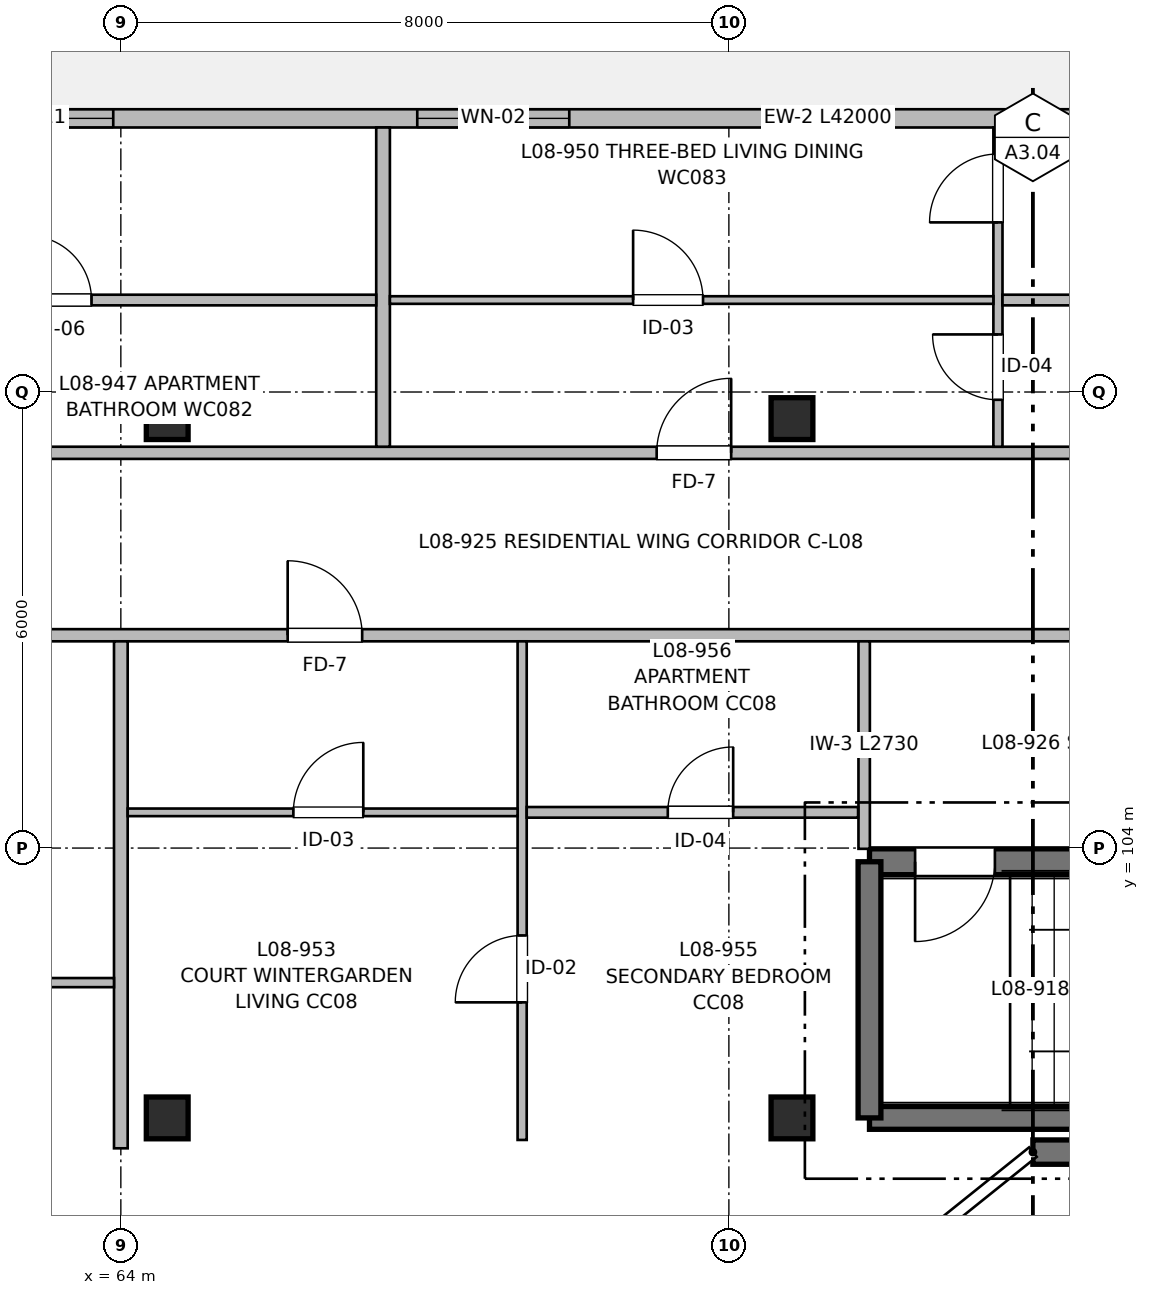
"""IFC4 building model, lengths in metres.
Left out: names, types, materials, properties, quantities, classifications, styles, units other than length and angle.
Written with IfcOpenShell. Run it as: python <this file> out.ifc"""

import sys

from ifc_helpers import new_model, si_unit, direction, frame, frame_2d, origin, origin_2d, place, context, subcontext, project, spatial, rectangle, extrude, element, fill, save


model = new_model("IFC4")
c1 = context("Model", 3, precision=1e-05, world=origin(), true_north=direction((0.0, 1.0)))
c2 = subcontext(c1, "Body", "Model", "MODEL_VIEW")
j1 = project(units=[si_unit("LENGTHUNIT", "METRE"), si_unit("PLANEANGLEUNIT", "RADIAN")], contexts=[c1])
p1 = place(None, origin())
s1 = spatial("IfcSite", under=j1, at=p1, CompositionType="ELEMENT")
p2 = place(p1, origin())
s2 = spatial("IfcBuilding", under=s1, at=p2, CompositionType="ELEMENT")
p3 = place(p2, frame((0.0, 0.0, 26.56)))
s3 = spatial("IfcBuildingStorey", under=s2, at=p3, CompositionType="ELEMENT", Elevation=26.56)
for number, where, z_axis, x_axis in (
    (1, (64.61, 100.45, 0.0), (0.0, 0.0, 1.0), (1.0, 0.0, 0.0)),
    (2, (64.61, 109.65, 0.0), (0.0, 0.0, 1.0), (1.0, 0.0, 0.0)),
    (3, (72.83, 100.45, 0.0), (0.0, 0.0, 1.0), (1.0, 0.0, 0.0)),
    (4, (72.83, 109.65, 0.0), (0.0, 0.0, 1.0), (1.0, 0.0, 0.0)),
):
    element("IfcColumn", number, at=place(p3, frame(where, z_axis=z_axis, x_axis=x_axis)), inside=s3, PredefinedType="COLUMN", context=c2, shape_type="SweptSolid", body=[
        extrude(rectangle(XDim=0.55, YDim=0.55, at=origin_2d()), origin(), (0.0, 0.0, 1.0), 3.2),
    ])
p4 = place(p3, frame((73.85, 100.45, 0.0), z_axis=(0.0, 0.0, 1.0), x_axis=(1.0, 0.0, 0.0)))
e5 = element("IfcWall", 5, at=p4, inside=s3, PredefinedType="SHEAR", context=c2, shape_type="SweptSolid", body=[
    extrude(rectangle(XDim=6.9, YDim=0.3, at=frame_2d((3.45, 0.0))), origin(), (0.0, 0.0, 1.0), 3.2),
])
p5 = place(p3, frame((80.75, 103.82, 0.0), z_axis=(0.0, 0.0, 1.0), x_axis=(-1.0, 0.0, 0.0)))
e6 = element("IfcWall", 6, at=p5, inside=s3, PredefinedType="SHEAR", context=c2, shape_type="SweptSolid", body=[
    extrude(rectangle(XDim=6.9, YDim=0.34, at=frame_2d((3.45, 0.0))), origin(), (0.0, 0.0, 1.0), 3.2),
])
p6 = place(p5, frame((5.25, 0.0, 0.0)))
e7 = element("IfcOpeningElement", 7, at=p6, cuts=e6, PredefinedType="OPENING", context=c2, shape_type="SweptSolid", body=[
    extrude(rectangle(XDim=1.05, YDim=2.15, at=frame_2d((0.525, 1.075))), frame((0.0, 0.18, 0.0), z_axis=(0.0, -1.0, 0.0), x_axis=(1.0, 0.0, 0.0)), (0.0, 0.0, 1.0), 0.36),
])
p7 = place(p3, frame((73.85, 103.82, 0.0), z_axis=(0.0, 0.0, 1.0), x_axis=(0.0, -1.0, 0.0)))
e8 = element("IfcWall", 8, at=p7, inside=s3, PredefinedType="SHEAR", context=c2, shape_type="SweptSolid", body=[
    extrude(rectangle(XDim=3.37, YDim=0.3, at=frame_2d((1.685, 0.0))), origin(), (0.0, 0.0, 1.0), 3.2),
])
p8 = place(p3, frame((81.5, 100.0, 0.0), z_axis=(0.0, 0.0, 1.0), x_axis=(-1.0, 0.0, 0.0)))
e9 = element("IfcWall", 9, at=p8, inside=s3, PredefinedType="SHEAR", context=c2, shape_type="SweptSolid", body=[
    extrude(rectangle(XDim=5.5, YDim=0.32, at=frame_2d((2.75, 0.0))), origin(), (0.0, 0.0, 1.0), 2.98),
])
p9 = place(p8, frame((1.45, 0.0, 0.67)))
e10 = element("IfcOpeningElement", 10, at=p9, cuts=e9, PredefinedType="OPENING", context=c2, shape_type="SweptSolid", body=[
    extrude(rectangle(XDim=2.6, YDim=1.55, at=frame_2d((1.3, 0.775))), frame((0.0, 0.17, 0.0), z_axis=(0.0, -1.0, 0.0), x_axis=(1.0, 0.0, 0.0)), (0.0, 0.0, 1.0), 0.34),
])
p10 = place(p3, frame((39.5, 113.6, 0.0), z_axis=(0.0, 0.0, 1.0), x_axis=(1.0, 0.0, 0.0)))
e11 = element("IfcWall", 11, at=p10, inside=s3, PredefinedType="SOLIDWALL", context=c2, shape_type="SweptSolid", body=[
    extrude(rectangle(XDim=42.0, YDim=0.24, at=frame_2d((21.0, 0.0))), origin(), (0.0, 0.0, 1.0), 2.98),
])
p11 = place(p10, frame((3.6, 0.0, 0.0)))
e12 = element("IfcOpeningElement", 12, at=p11, cuts=e11, PredefinedType="OPENING", context=c2, shape_type="SweptSolid", body=[
    extrude(rectangle(XDim=1.2, YDim=2.2, at=frame_2d((0.6, 1.1))), frame((0.0, 0.13, 0.0), z_axis=(0.0, -1.0, 0.0), x_axis=(1.0, 0.0, 0.0)), (0.0, 0.0, 1.0), 0.26),
])
p12 = place(p10, frame((5.5, 0.0, 0.87)))
e13 = element("IfcOpeningElement", 13, at=p12, cuts=e11, PredefinedType="OPENING", context=c2, shape_type="SweptSolid", body=[
    extrude(rectangle(XDim=1.25, YDim=1.35, at=frame_2d((0.625, 0.675))), frame((0.0, 0.13, 0.0), z_axis=(0.0, -1.0, 0.0), x_axis=(1.0, 0.0, 0.0)), (0.0, 0.0, 1.0), 0.26),
])
p13 = place(p10, frame((11.76, 0.0, 0.72)))
e14 = element("IfcOpeningElement", 14, at=p13, cuts=e11, PredefinedType="OPENING", context=c2, shape_type="SweptSolid", body=[
    extrude(rectangle(XDim=1.68, YDim=1.5, at=frame_2d((0.84, 0.75))), frame((0.0, 0.13, 0.0), z_axis=(0.0, -1.0, 0.0), x_axis=(1.0, 0.0, 0.0)), (0.0, 0.0, 1.0), 0.26),
])
p14 = place(p10, frame((20.4, 0.0, 0.0)))
e15 = element("IfcOpeningElement", 15, at=p14, cuts=e11, PredefinedType="OPENING", context=c2, shape_type="SweptSolid", body=[
    extrude(rectangle(XDim=1.2, YDim=2.2, at=frame_2d((0.6, 1.1))), frame((0.0, 0.13, 0.0), z_axis=(0.0, -1.0, 0.0), x_axis=(1.0, 0.0, 0.0)), (0.0, 0.0, 1.0), 0.26),
])
p15 = place(p10, frame((22.3, 0.0, 0.67)))
e16 = element("IfcOpeningElement", 16, at=p15, cuts=e11, PredefinedType="OPENING", context=c2, shape_type="SweptSolid", body=[
    extrude(rectangle(XDim=2.1, YDim=1.55, at=frame_2d((1.05, 0.775))), frame((0.0, 0.13, 0.0), z_axis=(0.0, -1.0, 0.0), x_axis=(1.0, 0.0, 0.0)), (0.0, 0.0, 1.0), 0.26),
])
p16 = place(p10, frame((28.4, 0.0, 0.72)))
e17 = element("IfcOpeningElement", 17, at=p16, cuts=e11, PredefinedType="OPENING", context=c2, shape_type="SweptSolid", body=[
    extrude(rectangle(XDim=2.0, YDim=1.5, at=frame_2d((1.0, 0.75))), frame((0.0, 0.13, 0.0), z_axis=(0.0, -1.0, 0.0), x_axis=(1.0, 0.0, 0.0)), (0.0, 0.0, 1.0), 0.26),
])
p17 = place(p10, frame((37.2, 0.0, 0.0)))
e18 = element("IfcOpeningElement", 18, at=p17, cuts=e11, PredefinedType="OPENING", context=c2, shape_type="SweptSolid", body=[
    extrude(rectangle(XDim=1.2, YDim=2.2, at=frame_2d((0.6, 1.1))), frame((0.0, 0.13, 0.0), z_axis=(0.0, -1.0, 0.0), x_axis=(1.0, 0.0, 0.0)), (0.0, 0.0, 1.0), 0.26),
])
p18 = place(p10, frame((39.1, 0.0, 0.9)))
e19 = element("IfcOpeningElement", 19, at=p18, cuts=e11, PredefinedType="OPENING", context=c2, shape_type="SweptSolid", body=[
    extrude(rectangle(XDim=1.05, YDim=1.15, at=frame_2d((0.525, 0.575))), frame((0.0, 0.13, 0.0), z_axis=(0.0, -1.0, 0.0), x_axis=(1.0, 0.0, 0.0)), (0.0, 0.0, 1.0), 0.26),
])
p19 = place(p3, frame((57.2, 106.8, 0.0), z_axis=(0.0, 0.0, 1.0), x_axis=(1.0, 0.0, 0.0)))
e20 = element("IfcWall", 20, at=p19, inside=s3, PredefinedType="PARTITIONING", context=c2, shape_type="SweptSolid", body=[
    extrude(rectangle(XDim=24.14, YDim=0.16, at=frame_2d((12.07, 0.0))), origin(), (0.0, 0.0, 1.0), 2.935),
])
p20 = place(p19, frame((19.575, 0.0, 0.0)))
e21 = element("IfcOpeningElement", 21, at=p20, cuts=e20, PredefinedType="OPENING", context=c2, shape_type="SweptSolid", body=[
    extrude(rectangle(XDim=1.05, YDim=2.15, at=frame_2d((0.525, 1.075))), frame((0.0, 0.09, 0.0), z_axis=(0.0, -1.0, 0.0), x_axis=(1.0, 0.0, 0.0)), (0.0, 0.0, 1.0), 0.18),
])
p21 = place(p19, frame((8.995, 0.0, 0.0)))
e22 = element("IfcOpeningElement", 22, at=p21, cuts=e20, PredefinedType="OPENING", context=c2, shape_type="SweptSolid", body=[
    extrude(rectangle(XDim=0.98, YDim=2.15, at=frame_2d((0.49, 1.075))), frame((0.0, 0.09, 0.0), z_axis=(0.0, -1.0, 0.0), x_axis=(1.0, 0.0, 0.0)), (0.0, 0.0, 1.0), 0.18),
])
p22 = place(p3, frame((39.66, 109.2, 0.0), z_axis=(0.0, 0.0, 1.0), x_axis=(1.0, 0.0, 0.0)))
e23 = element("IfcWall", 23, at=p22, inside=s3, PredefinedType="PARTITIONING", context=c2, shape_type="SweptSolid", body=[
    extrude(rectangle(XDim=41.68, YDim=0.16, at=frame_2d((20.84, 0.0))), origin(), (0.0, 0.0, 1.0), 2.935),
])
p23 = place(p22, frame((3.51, 0.0, 0.0)))
e24 = element("IfcOpeningElement", 24, at=p23, cuts=e23, PredefinedType="OPENING", context=c2, shape_type="SweptSolid", body=[
    extrude(rectangle(XDim=0.98, YDim=2.15, at=frame_2d((0.49, 1.075))), frame((0.0, 0.09, 0.0), z_axis=(0.0, -1.0, 0.0), x_axis=(1.0, 0.0, 0.0)), (0.0, 0.0, 1.0), 0.18),
])
p24 = place(p22, frame((17.47, 0.0, 0.0)))
e25 = element("IfcOpeningElement", 25, at=p24, cuts=e23, PredefinedType="OPENING", context=c2, shape_type="SweptSolid", body=[
    extrude(rectangle(XDim=0.98, YDim=2.15, at=frame_2d((0.49, 1.075))), frame((0.0, 0.09, 0.0), z_axis=(0.0, -1.0, 0.0), x_axis=(1.0, 0.0, 0.0)), (0.0, 0.0, 1.0), 0.18),
])
p25 = place(p22, frame((31.39, 0.0, 0.0)))
e26 = element("IfcOpeningElement", 26, at=p25, cuts=e23, PredefinedType="OPENING", context=c2, shape_type="SweptSolid", body=[
    extrude(rectangle(XDim=0.98, YDim=2.15, at=frame_2d((0.49, 1.075))), frame((0.0, 0.09, 0.0), z_axis=(0.0, -1.0, 0.0), x_axis=(1.0, 0.0, 0.0)), (0.0, 0.0, 1.0), 0.18),
])
p26 = place(p3, frame((64.0, 100.05, 0.0), z_axis=(0.0, 0.0, 1.0), x_axis=(0.0, 1.0, 0.0)))
e27 = element("IfcWall", 27, at=p26, inside=s3, PredefinedType="PARTITIONING", context=c2, shape_type="SweptSolid", body=[
    extrude(rectangle(XDim=6.67, YDim=0.18, at=frame_2d((3.335, 0.0))), origin(), (0.0, 0.0, 1.0), 2.935),
])
p27 = place(p3, frame((73.78, 103.99, 0.0), z_axis=(0.0, 0.0, 1.0), x_axis=(0.0, 1.0, 0.0)))
e28 = element("IfcWall", 28, at=p27, inside=s3, PredefinedType="PARTITIONING", context=c2, shape_type="SweptSolid", body=[
    extrude(rectangle(XDim=2.73, YDim=0.15, at=frame_2d((1.365, 0.0))), origin(), (0.0, 0.0, 1.0), 2.935),
])
p28 = place(p3, frame((59.72, 102.23, 0.0), z_axis=(0.0, 0.0, 1.0), x_axis=(1.0, 0.0, 0.0)))
e29 = element("IfcWall", 29, at=p28, inside=s3, PredefinedType="PARTITIONING", context=c2, shape_type="SweptSolid", body=[
    extrude(rectangle(XDim=4.19, YDim=0.12, at=frame_2d((2.095, 0.0))), origin(), (0.0, 0.0, 1.0), 2.935),
])
p29 = place(p28, frame((1.645, 0.0, 0.0)))
e30 = element("IfcOpeningElement", 30, at=p29, cuts=e29, PredefinedType="OPENING", context=c2, shape_type="SweptSolid", body=[
    extrude(rectangle(XDim=0.9, YDim=2.1, at=frame_2d((0.45, 1.05))), frame((0.0, 0.07, 0.0), z_axis=(0.0, -1.0, 0.0), x_axis=(1.0, 0.0, 0.0)), (0.0, 0.0, 1.0), 0.14),
])
p30 = place(p3, frame((67.45, 109.28, 0.0), z_axis=(0.0, 0.0, 1.0), x_axis=(0.0, 1.0, 0.0)))
e31 = element("IfcWall", 31, at=p30, inside=s3, PredefinedType="PARTITIONING", context=c2, shape_type="SweptSolid", body=[
    extrude(rectangle(XDim=4.2, YDim=0.18, at=frame_2d((2.1, 0.0))), origin(), (0.0, 0.0, 1.0), 2.935),
])
p31 = place(p3, frame((61.66, 111.21, 0.0), z_axis=(0.0, 0.0, 1.0), x_axis=(1.0, 0.0, 0.0)))
e32 = element("IfcWall", 32, at=p31, inside=s3, PredefinedType="PARTITIONING", context=c2, shape_type="SweptSolid", body=[
    extrude(rectangle(XDim=5.7, YDim=0.14, at=frame_2d((2.85, 0.0))), origin(), (0.0, 0.0, 1.0), 2.935),
])
p32 = place(p31, frame((1.104, 0.0, 0.0)))
e33 = element("IfcOpeningElement", 33, at=p32, cuts=e32, PredefinedType="OPENING", context=c2, shape_type="SweptSolid", body=[
    extrude(rectangle(XDim=0.85, YDim=2.05, at=frame_2d((0.425, 1.025))), frame((0.0, 0.08, 0.0), z_axis=(0.0, -1.0, 0.0), x_axis=(1.0, 0.0, 0.0)), (0.0, 0.0, 1.0), 0.16),
])
p33 = place(p3, frame((75.54, 109.28, 0.0), z_axis=(0.0, 0.0, 1.0), x_axis=(0.0, 1.0, 0.0)))
e34 = element("IfcWall", 34, at=p33, inside=s3, PredefinedType="PARTITIONING", context=c2, shape_type="SweptSolid", body=[
    extrude(rectangle(XDim=4.2, YDim=0.12, at=frame_2d((2.1, 0.0))), origin(), (0.0, 0.0, 1.0), 2.935),
])
p34 = place(p33, frame((0.618, 0.0, 0.0)))
e35 = element("IfcOpeningElement", 35, at=p34, cuts=e34, PredefinedType="OPENING", context=c2, shape_type="SweptSolid", body=[
    extrude(rectangle(XDim=0.86, YDim=2.1, at=frame_2d((0.43, 1.05))), frame((0.0, 0.07, 0.0), z_axis=(0.0, -1.0, 0.0), x_axis=(1.0, 0.0, 0.0)), (0.0, 0.0, 1.0), 0.14),
])
p35 = place(p33, frame((2.951, 0.0, 0.0)))
e36 = element("IfcOpeningElement", 36, at=p35, cuts=e34, PredefinedType="OPENING", context=c2, shape_type="SweptSolid", body=[
    extrude(rectangle(XDim=0.9, YDim=2.1, at=frame_2d((0.45, 1.05))), frame((0.0, 0.07, 0.0), z_axis=(0.0, -1.0, 0.0), x_axis=(1.0, 0.0, 0.0)), (0.0, 0.0, 1.0), 0.14),
])
p36 = place(p3, frame((75.6, 111.21, 0.0), z_axis=(0.0, 0.0, 1.0), x_axis=(1.0, 0.0, 0.0)))
e37 = element("IfcWall", 37, at=p36, inside=s3, PredefinedType="PARTITIONING", context=c2, shape_type="SweptSolid", body=[
    extrude(rectangle(XDim=5.74, YDim=0.14, at=frame_2d((2.87, 0.0))), origin(), (0.0, 0.0, 1.0), 2.935),
])
p37 = place(p36, frame((2.32, 0.0, 0.0)))
e38 = element("IfcOpeningElement", 38, at=p37, cuts=e37, PredefinedType="OPENING", context=c2, shape_type="SweptSolid", body=[
    extrude(rectangle(XDim=0.85, YDim=2.05, at=frame_2d((0.425, 1.025))), frame((0.0, 0.08, 0.0), z_axis=(0.0, -1.0, 0.0), x_axis=(1.0, 0.0, 0.0)), (0.0, 0.0, 1.0), 0.16),
])
p38 = place(p3, frame((67.54, 111.21, 0.0), z_axis=(0.0, 0.0, 1.0), x_axis=(1.0, 0.0, 0.0)))
e39 = element("IfcWall", 39, at=p38, inside=s3, PredefinedType="PARTITIONING", context=c2, shape_type="SweptSolid", body=[
    extrude(rectangle(XDim=7.94, YDim=0.1, at=frame_2d((3.97, 0.0))), origin(), (0.0, 0.0, 1.0), 2.935),
])
p39 = place(p38, frame((3.2, 0.0, 0.0)))
e40 = element("IfcOpeningElement", 40, at=p39, cuts=e39, PredefinedType="OPENING", context=c2, shape_type="SweptSolid", body=[
    extrude(rectangle(XDim=0.92, YDim=2.1, at=frame_2d((0.46, 1.05))), frame((0.0, 0.06, 0.0), z_axis=(0.0, -1.0, 0.0), x_axis=(1.0, 0.0, 0.0)), (0.0, 0.0, 1.0), 0.12),
])
p40 = place(p3, frame((69.28, 100.16, 0.0), z_axis=(0.0, 0.0, 1.0), x_axis=(0.0, 1.0, 0.0)))
e41 = element("IfcWall", 41, at=p40, inside=s3, PredefinedType="PARTITIONING", context=c2, shape_type="SweptSolid", body=[
    extrude(rectangle(XDim=6.56, YDim=0.12, at=frame_2d((3.28, 0.0))), origin(), (0.0, 0.0, 1.0), 2.935),
])
p41 = place(p40, frame((1.81, 0.0, 0.0)))
e42 = element("IfcOpeningElement", 42, at=p41, cuts=e41, PredefinedType="OPENING", context=c2, shape_type="SweptSolid", body=[
    extrude(rectangle(XDim=0.88, YDim=2.1, at=frame_2d((0.44, 1.05))), frame((0.0, 0.07, 0.0), z_axis=(0.0, -1.0, 0.0), x_axis=(1.0, 0.0, 0.0)), (0.0, 0.0, 1.0), 0.14),
])
p42 = place(p3, frame((69.34, 104.47, 0.0), z_axis=(0.0, 0.0, 1.0), x_axis=(1.0, 0.0, 0.0)))
e43 = element("IfcWall", 43, at=p42, inside=s3, PredefinedType="PARTITIONING", context=c2, shape_type="SweptSolid", body=[
    extrude(rectangle(XDim=4.36, YDim=0.14, at=frame_2d((2.18, 0.0))), origin(), (0.0, 0.0, 1.0), 2.935),
])
p43 = place(p42, frame((1.856, 0.0, 0.0)))
e44 = element("IfcOpeningElement", 44, at=p43, cuts=e43, PredefinedType="OPENING", context=c2, shape_type="SweptSolid", body=[
    extrude(rectangle(XDim=0.86, YDim=2.1, at=frame_2d((0.43, 1.05))), frame((0.0, 0.08, 0.0), z_axis=(0.0, -1.0, 0.0), x_axis=(1.0, 0.0, 0.0)), (0.0, 0.0, 1.0), 0.16),
])
p44 = place(p3, frame((64.09, 104.47, 0.0), z_axis=(0.0, 0.0, 1.0), x_axis=(1.0, 0.0, 0.0)))
e45 = element("IfcWall", 45, at=p44, inside=s3, PredefinedType="PARTITIONING", context=c2, shape_type="SweptSolid", body=[
    extrude(rectangle(XDim=5.13, YDim=0.1, at=frame_2d((2.565, 0.0))), origin(), (0.0, 0.0, 1.0), 2.935),
])
p45 = place(p44, frame((2.18, 0.0, 0.0)))
e46 = element("IfcOpeningElement", 46, at=p45, cuts=e45, PredefinedType="OPENING", context=c2, shape_type="SweptSolid", body=[
    extrude(rectangle(XDim=0.92, YDim=2.1, at=frame_2d((0.46, 1.05))), frame((0.0, 0.06, 0.0), z_axis=(0.0, -1.0, 0.0), x_axis=(1.0, 0.0, 0.0)), (0.0, 0.0, 1.0), 0.12),
])
p46 = place(p6, origin())
e47 = element("IfcDoor", 47, at=p46, inside=s3, OperationType="SINGLE_SWING_RIGHT", PredefinedType="DOOR", context=c2, shape_type="SweptSolid", body=[
    extrude(rectangle(XDim=1.05, YDim=2.15, at=frame_2d((0.525, 1.075))), frame((0.0, 0.025, 0.0), z_axis=(0.0, -1.0, 0.0), x_axis=(1.0, 0.0, 0.0)), (0.0, 0.0, 1.0), 0.05),
])
fill(e7, e47)
p47 = place(p15, origin())
e48 = element("IfcWindow", 48, at=p47, inside=s3, PartitioningType="SINGLE_PANEL", PredefinedType="WINDOW", context=c2, shape_type="SweptSolid", body=[
    extrude(rectangle(XDim=2.1, YDim=1.55, at=frame_2d((1.05, 0.775))), frame((0.0, 0.03, 0.0), z_axis=(0.0, -1.0, 0.0), x_axis=(1.0, 0.0, 0.0)), (0.0, 0.0, 1.0), 0.06),
])
fill(e16, e48)
p48 = place(p16, origin())
e49 = element("IfcWindow", 49, at=p48, inside=s3, PartitioningType="SINGLE_PANEL", PredefinedType="WINDOW", context=c2, shape_type="SweptSolid", body=[
    extrude(rectangle(XDim=2.0, YDim=1.5, at=frame_2d((1.0, 0.75))), frame((0.0, 0.03, 0.0), z_axis=(0.0, -1.0, 0.0), x_axis=(1.0, 0.0, 0.0)), (0.0, 0.0, 1.0), 0.06),
])
fill(e17, e49)
p49 = place(p32, origin())
e50 = element("IfcDoor", 50, at=p49, inside=s3, OperationType="SINGLE_SWING_LEFT", PredefinedType="DOOR", context=c2, shape_type="SweptSolid", body=[
    extrude(rectangle(XDim=0.85, YDim=2.05, at=frame_2d((0.425, 1.025))), frame((0.0, 0.025, 0.0), z_axis=(0.0, -1.0, 0.0), x_axis=(1.0, 0.0, 0.0)), (0.0, 0.0, 1.0), 0.05),
])
fill(e33, e50)
p50 = place(p25, origin())
e51 = element("IfcDoor", 51, at=p50, inside=s3, OperationType="SINGLE_SWING_RIGHT", PredefinedType="DOOR", context=c2, shape_type="SweptSolid", body=[
    extrude(rectangle(XDim=0.98, YDim=2.15, at=frame_2d((0.49, 1.075))), frame((0.0, 0.025, 0.0), z_axis=(0.0, -1.0, 0.0), x_axis=(1.0, 0.0, 0.0)), (0.0, 0.0, 1.0), 0.05),
])
fill(e26, e51)
p51 = place(p39, origin())
e52 = element("IfcDoor", 52, at=p51, inside=s3, OperationType="SINGLE_SWING_LEFT", PredefinedType="DOOR", context=c2, shape_type="SweptSolid", body=[
    extrude(rectangle(XDim=0.92, YDim=2.1, at=frame_2d((0.46, 1.05))), frame((0.0, 0.025, 0.0), z_axis=(0.0, -1.0, 0.0), x_axis=(1.0, 0.0, 0.0)), (0.0, 0.0, 1.0), 0.05),
])
fill(e40, e52)
p52 = place(p34, origin())
e53 = element("IfcDoor", 53, at=p52, inside=s3, OperationType="SINGLE_SWING_RIGHT", PredefinedType="DOOR", context=c2, shape_type="SweptSolid", body=[
    extrude(rectangle(XDim=0.86, YDim=2.1, at=frame_2d((0.43, 1.05))), frame((0.0, 0.025, 0.0), z_axis=(0.0, -1.0, 0.0), x_axis=(1.0, 0.0, 0.0)), (0.0, 0.0, 1.0), 0.05),
])
fill(e35, e53)
p53 = place(p35, origin())
e54 = element("IfcDoor", 54, at=p53, inside=s3, OperationType="SINGLE_SWING_LEFT", PredefinedType="DOOR", context=c2, shape_type="SweptSolid", body=[
    extrude(rectangle(XDim=0.9, YDim=2.1, at=frame_2d((0.45, 1.05))), frame((0.0, 0.025, 0.0), z_axis=(0.0, -1.0, 0.0), x_axis=(1.0, 0.0, 0.0)), (0.0, 0.0, 1.0), 0.05),
])
fill(e36, e54)
p54 = place(p21, origin())
e55 = element("IfcDoor", 55, at=p54, inside=s3, OperationType="SINGLE_SWING_LEFT", PredefinedType="DOOR", context=c2, shape_type="SweptSolid", body=[
    extrude(rectangle(XDim=0.98, YDim=2.15, at=frame_2d((0.49, 1.075))), frame((0.0, 0.025, 0.0), z_axis=(0.0, -1.0, 0.0), x_axis=(1.0, 0.0, 0.0)), (0.0, 0.0, 1.0), 0.05),
])
fill(e22, e55)
p55 = place(p45, origin())
e56 = element("IfcDoor", 56, at=p55, inside=s3, OperationType="SINGLE_SWING_RIGHT", PredefinedType="DOOR", context=c2, shape_type="SweptSolid", body=[
    extrude(rectangle(XDim=0.92, YDim=2.1, at=frame_2d((0.46, 1.05))), frame((0.0, 0.025, 0.0), z_axis=(0.0, -1.0, 0.0), x_axis=(1.0, 0.0, 0.0)), (0.0, 0.0, 1.0), 0.05),
])
fill(e46, e56)
p56 = place(p41, origin())
e57 = element("IfcDoor", 57, at=p56, inside=s3, OperationType="SINGLE_SWING_LEFT", PredefinedType="DOOR", context=c2, shape_type="SweptSolid", body=[
    extrude(rectangle(XDim=0.88, YDim=2.1, at=frame_2d((0.44, 1.05))), frame((0.0, 0.025, 0.0), z_axis=(0.0, -1.0, 0.0), x_axis=(1.0, 0.0, 0.0)), (0.0, 0.0, 1.0), 0.05),
])
fill(e42, e57)
p57 = place(p43, origin())
e58 = element("IfcDoor", 58, at=p57, inside=s3, OperationType="SINGLE_SWING_RIGHT", PredefinedType="DOOR", context=c2, shape_type="SweptSolid", body=[
    extrude(rectangle(XDim=0.86, YDim=2.1, at=frame_2d((0.43, 1.05))), frame((0.0, 0.025, 0.0), z_axis=(0.0, -1.0, 0.0), x_axis=(1.0, 0.0, 0.0)), (0.0, 0.0, 1.0), 0.05),
])
fill(e44, e58)
save(model, sys.argv[1])
